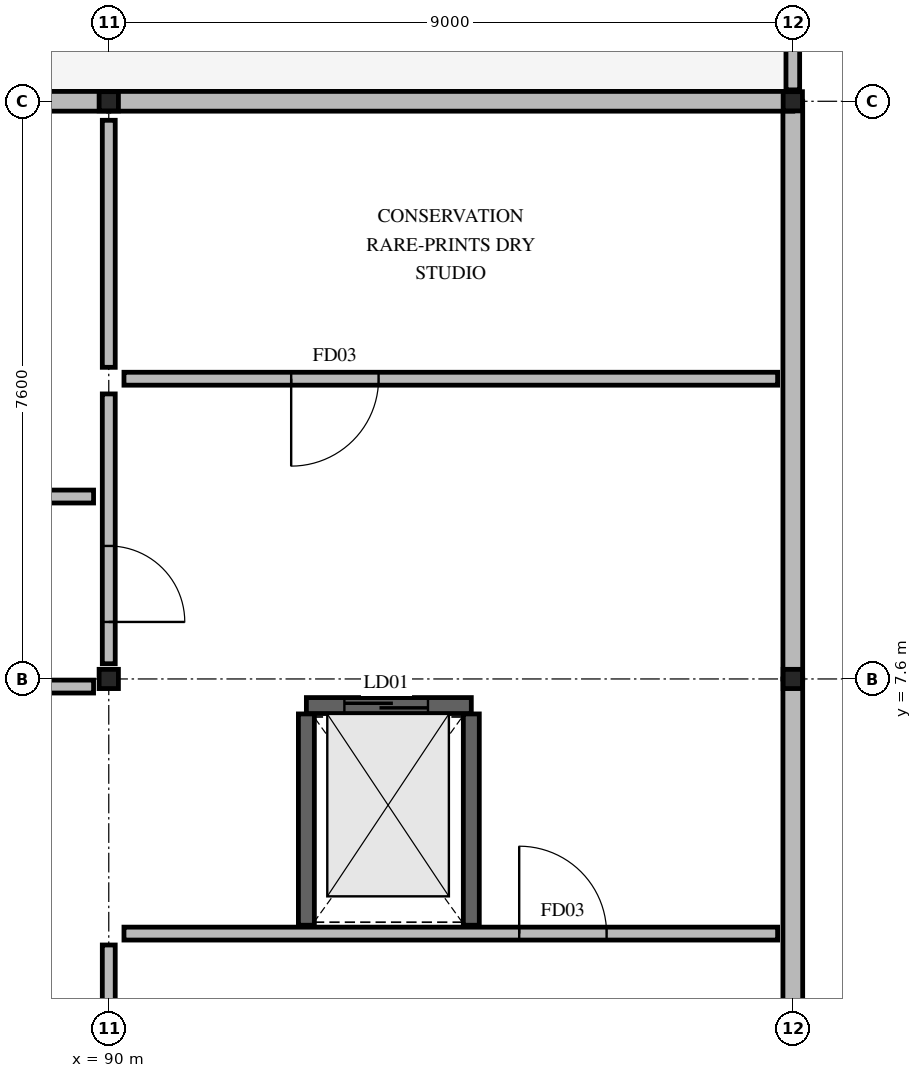
"""IFC4 building model, lengths in metres.
Left out: names, types, materials, properties, quantities, classifications, styles, units other than length and angle.
Written with IfcOpenShell. Run it as: python <this file> out.ifc"""

import sys

from ifc_helpers import new_model, si_unit, direction, frame, frame_2d, origin, origin_2d, place, context, subcontext, project, spatial, rectangle, i_section, extrude, element, fill, save


model = new_model("IFC4")
c1 = context("Model", 3, precision=1e-05, world=origin(), true_north=direction((0.0, 1.0)))
c2 = subcontext(c1, "Body", "Model", "MODEL_VIEW")
j1 = project(units=[si_unit("LENGTHUNIT", "METRE"), si_unit("PLANEANGLEUNIT", "RADIAN")], contexts=[c1])
p1 = place(None, origin())
s1 = spatial("IfcSite", under=j1, at=p1, CompositionType="ELEMENT")
p2 = place(p1, origin())
s2 = spatial("IfcBuilding", under=s1, at=p2, CompositionType="ELEMENT")
p3 = place(p2, frame((0.0, 0.0, 26.64)))
s3 = spatial("IfcBuildingStorey", under=s2, at=p3, CompositionType="ELEMENT", Elevation=26.64)
p4 = place(p3, frame((90.0, 7.6, 0.0), z_axis=(0.0, 0.0, 1.0), x_axis=(1.0, 0.0, 0.0)))
e1 = element("IfcColumn", 1, at=p4, inside=s3, PredefinedType="COLUMN", context=c2, shape_type="SweptSolid", body=[
    extrude(i_section(OverallWidth=0.254, OverallDepth=0.253, WebThickness=0.009, FlangeThickness=0.014, FilletRadius=0.012, at=origin_2d()), origin(), (0.0, 0.0, 1.0), 3.54),
])
p5 = place(p3, frame((90.0, 15.2, 0.0), z_axis=(0.0, 0.0, 1.0), x_axis=(1.0, 0.0, 0.0)))
e2 = element("IfcColumn", 2, at=p5, inside=s3, PredefinedType="COLUMN", context=c2, shape_type="SweptSolid", body=[
    extrude(i_section(OverallWidth=0.254, OverallDepth=0.253, WebThickness=0.009, FlangeThickness=0.014, FilletRadius=0.012, at=origin_2d()), origin(), (0.0, 0.0, 1.0), 4.14),
])
p6 = place(p3, frame((99.0, 7.6, 0.0), z_axis=(0.0, 0.0, 1.0), x_axis=(1.0, 0.0, 0.0)))
e3 = element("IfcColumn", 3, at=p6, inside=s3, PredefinedType="COLUMN", context=c2, shape_type="SweptSolid", body=[
    extrude(i_section(OverallWidth=0.254, OverallDepth=0.253, WebThickness=0.009, FlangeThickness=0.014, FilletRadius=0.012, at=origin_2d()), origin(), (0.0, 0.0, 1.0), 3.54),
])
p7 = place(p3, frame((99.0, 15.2, 0.0), z_axis=(0.0, 0.0, 1.0), x_axis=(1.0, 0.0, 0.0)))
e4 = element("IfcColumn", 4, at=p7, inside=s3, PredefinedType="COLUMN", context=c2, shape_type="SweptSolid", body=[
    extrude(i_section(OverallWidth=0.254, OverallDepth=0.253, WebThickness=0.009, FlangeThickness=0.014, FilletRadius=0.012, at=origin_2d()), origin(), (0.0, 0.0, 1.0), 4.14),
])
p8 = place(p3, frame((99.0, 0.0, 0.0), z_axis=(0.0, 0.0, 1.0), x_axis=(0.0, 1.0, 0.0)))
e5 = element("IfcWall", 5, at=p8, inside=s3, PredefinedType="STANDARD", context=c2, shape_type="SweptSolid", body=[
    extrude(rectangle(XDim=7.6, YDim=0.26, at=frame_2d((3.8, 0.0))), origin(), (0.0, 0.0, 1.0), 2.44),
])
p9 = place(p3, frame((99.0, 7.6, 0.0), z_axis=(0.0, 0.0, 1.0), x_axis=(0.0, 1.0, 0.0)))
e6 = element("IfcWall", 6, at=p9, inside=s3, PredefinedType="STANDARD", context=c2, shape_type="SweptSolid", body=[
    extrude(rectangle(XDim=7.6, YDim=0.26, at=frame_2d((3.8, 0.0))), origin(), (0.0, 0.0, 1.0), 2.44),
])
for number, where, z_axis, x_axis in (
    (7, (99.0, 15.2, 0.0), (0.0, 0.0, 1.0), (-1.0, 0.0, 0.0)),
    (8, (90.0, 15.2, 0.0), (0.0, 0.0, 1.0), (-1.0, 0.0, 0.0)),
):
    element("IfcWall", number, at=place(p3, frame(where, z_axis=z_axis, x_axis=x_axis)), inside=s3, PredefinedType="STANDARD", context=c2, shape_type="SweptSolid", body=[
        extrude(rectangle(XDim=9.0, YDim=0.26, at=frame_2d((4.5, 0.0))), origin(), (0.0, 0.0, 1.0), 2.44),
    ])
p10 = place(p3, frame((99.0, 22.8, 0.0), z_axis=(0.0, 0.0, 1.0), x_axis=(0.0, -1.0, 0.0)))
e9 = element("IfcWall", 9, at=p10, inside=s3, PredefinedType="PARAPET", context=c2, shape_type="SweptSolid", body=[
    extrude(rectangle(XDim=7.45, YDim=0.18, at=frame_2d((3.725, 0.0))), origin(), (0.0, 0.0, 1.0), 1.05),
])
p11 = place(p3, frame((90.2, 4.25, 0.0), z_axis=(0.0, 0.0, 1.0), x_axis=(1.0, 0.0, 0.0)))
e10 = element("IfcWall", 10, at=p11, inside=s3, PredefinedType="PARTITIONING", context=c2, shape_type="SweptSolid", body=[
    extrude(rectangle(XDim=8.6, YDim=0.17, at=frame_2d((4.3, 0.0))), origin(), (0.0, 0.0, 1.0), 2.44),
])
p12 = place(p11, frame((5.2, 0.0, 0.0)))
e11 = element("IfcOpeningElement", 11, at=p12, cuts=e10, PredefinedType="OPENING", context=c2, shape_type="SweptSolid", body=[
    extrude(rectangle(XDim=1.15, YDim=2.15, at=frame_2d((0.575, 1.075))), frame((0.0, 0.095, 0.0), z_axis=(0.0, -1.0, 0.0), x_axis=(1.0, 0.0, 0.0)), (0.0, 0.0, 1.0), 0.19),
])
for number, where, z_axis, x_axis in (
    (12, (92.6, 4.36, 0.0), (0.0, 0.0, 1.0), (0.0, 1.0, 0.0)),
    (13, (94.77, 4.36, 0.0), (0.0, 0.0, 1.0), (0.0, 1.0, 0.0)),
):
    element("IfcWall", number, at=place(p3, frame(where, z_axis=z_axis, x_axis=x_axis)), inside=s3, PredefinedType="SOLIDWALL", context=c2, shape_type="SweptSolid", body=[
        extrude(rectangle(XDim=2.78, YDim=0.21, at=frame_2d((1.39, 0.0))), origin(), (0.0, 0.0, 1.0), 2.44),
    ])
p13 = place(p3, frame((92.6, 7.25, 0.0), z_axis=(0.0, 0.0, 1.0), x_axis=(1.0, 0.0, 0.0)))
e14 = element("IfcWall", 14, at=p13, inside=s3, PredefinedType="SOLIDWALL", context=c2, shape_type="SweptSolid", body=[
    extrude(rectangle(XDim=2.17, YDim=0.21, at=frame_2d((1.085, 0.0))), origin(), (0.0, 0.0, 1.0), 2.44),
])
p14 = place(p13, frame((0.5, 0.0, 0.0)))
e15 = element("IfcOpeningElement", 15, at=p14, cuts=e14, PredefinedType="OPENING", context=c2, shape_type="SweptSolid", body=[
    extrude(rectangle(XDim=1.1, YDim=2.14, at=frame_2d((0.55, 1.07))), frame((0.0, 0.115, 0.0), z_axis=(0.0, -1.0, 0.0), x_axis=(1.0, 0.0, 0.0)), (0.0, 0.0, 1.0), 0.23),
])
p15 = place(p3, frame((90.2, 11.55, 0.0), z_axis=(0.0, 0.0, 1.0), x_axis=(1.0, 0.0, 0.0)))
e16 = element("IfcWall", 16, at=p15, inside=s3, PredefinedType="PARTITIONING", context=c2, shape_type="SweptSolid", body=[
    extrude(rectangle(XDim=8.6, YDim=0.17, at=frame_2d((4.3, 0.0))), origin(), (0.0, 0.0, 1.0), 2.44),
])
p16 = place(p15, frame((2.2, 0.0, 0.0)))
e17 = element("IfcOpeningElement", 17, at=p16, cuts=e16, PredefinedType="OPENING", context=c2, shape_type="SweptSolid", body=[
    extrude(rectangle(XDim=1.15, YDim=2.15, at=frame_2d((0.575, 1.075))), frame((0.0, 0.095, 0.0), z_axis=(0.0, -1.0, 0.0), x_axis=(1.0, 0.0, 0.0)), (0.0, 0.0, 1.0), 0.19),
])
p17 = place(p3, frame((90.0, 0.25, 0.0), z_axis=(0.0, 0.0, 1.0), x_axis=(0.0, 1.0, 0.0)))
e18 = element("IfcWall", 18, at=p17, inside=s3, PredefinedType="PARTITIONING", context=c2, shape_type="SweptSolid", body=[
    extrude(rectangle(XDim=3.85, YDim=0.17, at=frame_2d((1.925, 0.0))), origin(), (0.0, 0.0, 1.0), 2.44),
])
p18 = place(p3, frame((90.0, 7.8, 0.0), z_axis=(0.0, 0.0, 1.0), x_axis=(0.0, 1.0, 0.0)))
e19 = element("IfcWall", 19, at=p18, inside=s3, PredefinedType="PARTITIONING", context=c2, shape_type="SweptSolid", body=[
    extrude(rectangle(XDim=3.55, YDim=0.17, at=frame_2d((1.775, 0.0))), origin(), (0.0, 0.0, 1.0), 2.44),
])
p19 = place(p18, frame((0.55, 0.0, 0.0)))
e20 = element("IfcOpeningElement", 20, at=p19, cuts=e19, PredefinedType="OPENING", context=c2, shape_type="SweptSolid", body=[
    extrude(rectangle(XDim=1.0, YDim=2.15, at=frame_2d((0.5, 1.075))), frame((0.0, 0.095, 0.0), z_axis=(0.0, -1.0, 0.0), x_axis=(1.0, 0.0, 0.0)), (0.0, 0.0, 1.0), 0.19),
])
p20 = place(p3, frame((90.0, 11.7, 0.0), z_axis=(0.0, 0.0, 1.0), x_axis=(0.0, 1.0, 0.0)))
e21 = element("IfcWall", 21, at=p20, inside=s3, PredefinedType="PARTITIONING", context=c2, shape_type="SweptSolid", body=[
    extrude(rectangle(XDim=3.25, YDim=0.17, at=frame_2d((1.625, 0.0))), origin(), (0.0, 0.0, 1.0), 2.44),
])
p21 = place(p3, frame((72.2, 7.5, 0.0), z_axis=(0.0, 0.0, 1.0), x_axis=(1.0, 0.0, 0.0)))
e22 = element("IfcWall", 22, at=p21, inside=s3, PredefinedType="PARTITIONING", context=c2, shape_type="SweptSolid", body=[
    extrude(rectangle(XDim=17.6, YDim=0.17, at=frame_2d((8.8, 0.0))), origin(), (0.0, 0.0, 1.0), 2.44),
])
p22 = place(p21, frame((4.2, 0.0, 0.0)))
e23 = element("IfcOpeningElement", 23, at=p22, cuts=e22, PredefinedType="OPENING", context=c2, shape_type="SweptSolid", body=[
    extrude(rectangle(XDim=1.15, YDim=2.15, at=frame_2d((0.575, 1.075))), frame((0.0, 0.095, 0.0), z_axis=(0.0, -1.0, 0.0), x_axis=(1.0, 0.0, 0.0)), (0.0, 0.0, 1.0), 0.19),
])
p23 = place(p3, frame((72.2, 10.0, 0.0), z_axis=(0.0, 0.0, 1.0), x_axis=(1.0, 0.0, 0.0)))
e24 = element("IfcWall", 24, at=p23, inside=s3, PredefinedType="PARTITIONING", context=c2, shape_type="SweptSolid", body=[
    extrude(rectangle(XDim=17.6, YDim=0.17, at=frame_2d((8.8, 0.0))), origin(), (0.0, 0.0, 1.0), 2.44),
])
p24 = place(p23, frame((4.2, 0.0, 0.0)))
e25 = element("IfcOpeningElement", 25, at=p24, cuts=e24, PredefinedType="OPENING", context=c2, shape_type="SweptSolid", body=[
    extrude(rectangle(XDim=1.15, YDim=2.15, at=frame_2d((0.575, 1.075))), frame((0.0, 0.095, 0.0), z_axis=(0.0, -1.0, 0.0), x_axis=(1.0, 0.0, 0.0)), (0.0, 0.0, 1.0), 0.19),
])
p25 = place(p12, origin())
e26 = element("IfcDoor", 26, at=p25, inside=s3, OperationType="SINGLE_SWING_LEFT", PredefinedType="DOOR", context=c2, shape_type="SweptSolid", body=[
    extrude(rectangle(XDim=1.15, YDim=2.15, at=frame_2d((0.575, 1.075))), frame((0.0, 0.025, 0.0), z_axis=(0.0, -1.0, 0.0), x_axis=(1.0, 0.0, 0.0)), (0.0, 0.0, 1.0), 0.05),
])
fill(e11, e26)
p26 = place(p14, origin())
e27 = element("IfcDoor", 27, at=p26, inside=s3, OperationType="SLIDING_TO_LEFT", PredefinedType="DOOR", context=c2, shape_type="SweptSolid", body=[
    extrude(rectangle(XDim=1.1, YDim=2.14, at=frame_2d((0.55, 1.07))), frame((0.0, 0.025, 0.0), z_axis=(0.0, -1.0, 0.0), x_axis=(1.0, 0.0, 0.0)), (0.0, 0.0, 1.0), 0.05),
])
fill(e15, e27)
p27 = place(p16, origin())
e28 = element("IfcDoor", 28, at=p27, inside=s3, OperationType="SINGLE_SWING_RIGHT", PredefinedType="DOOR", context=c2, shape_type="SweptSolid", body=[
    extrude(rectangle(XDim=1.15, YDim=2.15, at=frame_2d((0.575, 1.075))), frame((0.0, 0.025, 0.0), z_axis=(0.0, -1.0, 0.0), x_axis=(1.0, 0.0, 0.0)), (0.0, 0.0, 1.0), 0.05),
])
fill(e17, e28)
p28 = place(p19, origin())
e29 = element("IfcDoor", 29, at=p28, inside=s3, OperationType="SINGLE_SWING_RIGHT", PredefinedType="DOOR", context=c2, shape_type="SweptSolid", body=[
    extrude(rectangle(XDim=1.0, YDim=2.15, at=frame_2d((0.5, 1.075))), frame((0.0, 0.025, 0.0), z_axis=(0.0, -1.0, 0.0), x_axis=(1.0, 0.0, 0.0)), (0.0, 0.0, 1.0), 0.05),
])
fill(e20, e29)
save(model, sys.argv[1])
